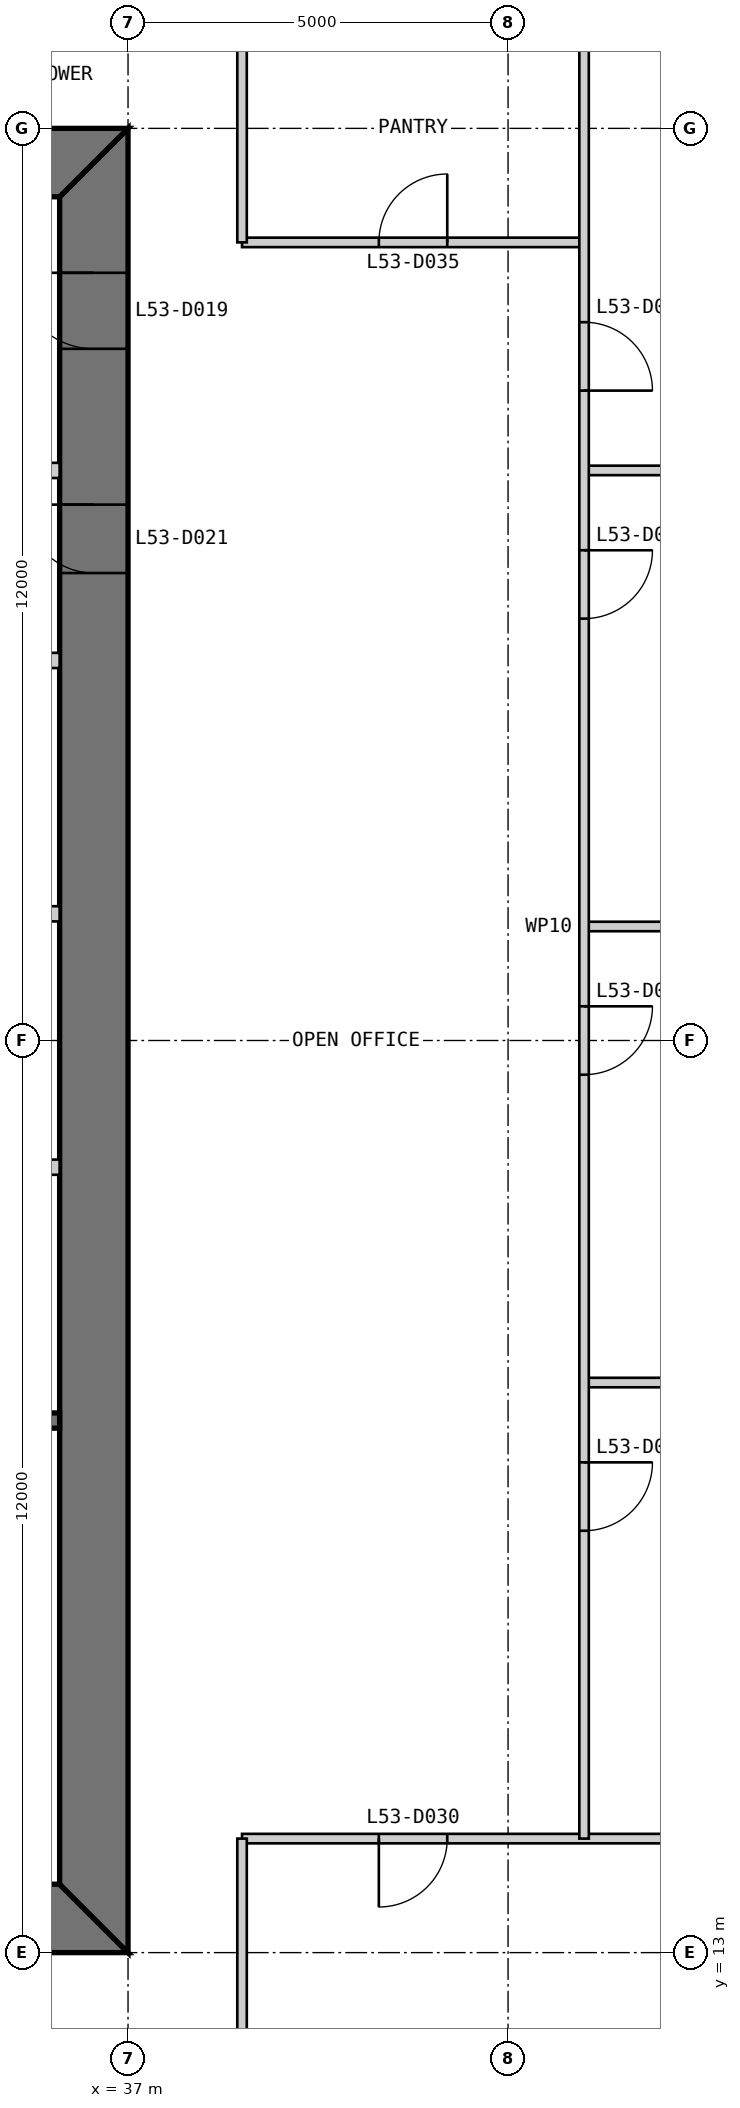
"""IFC4 building model, lengths in metres.
Left out: names, types, materials, properties, quantities, classifications, styles, units other than length and angle.
Written with IfcOpenShell. Run it as: python <this file> out.ifc"""

import sys

from ifc_helpers import new_model, si_unit, direction, frame, frame_2d, origin, place, context, subcontext, project, spatial, polyline, rectangle, outline, extrude, element, fill, save


model = new_model("IFC4")
c1 = context("Model", 3, precision=1e-05, world=origin(), true_north=direction((0.0, 1.0)))
c2 = subcontext(c1, "Body", "Model", "MODEL_VIEW")
j1 = project(units=[si_unit("LENGTHUNIT", "METRE"), si_unit("PLANEANGLEUNIT", "RADIAN")], contexts=[c1])
p1 = place(None, origin())
s1 = spatial("IfcSite", under=j1, at=p1, CompositionType="ELEMENT")
p2 = place(p1, origin())
s2 = spatial("IfcBuilding", under=s1, at=p2, CompositionType="ELEMENT")
p3 = place(p2, frame((0.0, 0.0, 225.8)))
s3 = spatial("IfcBuildingStorey", under=s2, at=p3, CompositionType="ELEMENT", Elevation=225.8)
p4 = place(p3, frame((13.0, 13.45, 0.0), z_axis=(0.0, 0.0, 1.0), x_axis=(1.0, 0.0, 0.0)))
e1 = element("IfcWall", 1, at=p4, inside=s3, PredefinedType="SHEAR", context=c2, shape_type="SweptSolid", body=[
    extrude(outline(polyline([(0.0, -0.45), (24.0, -0.45), (23.1, 0.45), (0.9, 0.45), (0.0, -0.45)])), origin(), (0.0, 0.0, 1.0), 4.0),
])
p5 = place(p4, frame((4.9, 0.0, 0.0)))
e2 = element("IfcOpeningElement", 2, at=p5, cuts=e1, PredefinedType="OPENING", context=c2, shape_type="SweptSolid", body=[
    extrude(rectangle(XDim=1.0, YDim=2.2, at=frame_2d((0.5, 1.1))), frame((0.0, 0.46, 0.0), z_axis=(0.0, -1.0, 0.0), x_axis=(1.0, 0.0, 0.0)), (0.0, 0.0, 1.0), 0.92),
])
p6 = place(p4, frame((8.9, 0.0, 0.0)))
e3 = element("IfcOpeningElement", 3, at=p6, cuts=e1, PredefinedType="OPENING", context=c2, shape_type="SweptSolid", body=[
    extrude(rectangle(XDim=1.1, YDim=2.2, at=frame_2d((0.55, 1.1))), frame((0.0, 0.46, 0.0), z_axis=(0.0, -1.0, 0.0), x_axis=(1.0, 0.0, 0.0)), (0.0, 0.0, 1.0), 0.92),
])
p7 = place(p4, frame((15.05, 0.0, 0.0)))
e4 = element("IfcOpeningElement", 4, at=p7, cuts=e1, PredefinedType="OPENING", context=c2, shape_type="SweptSolid", body=[
    extrude(rectangle(XDim=0.9, YDim=2.2, at=frame_2d((0.45, 1.1))), frame((0.0, 0.46, 0.0), z_axis=(0.0, -1.0, 0.0), x_axis=(1.0, 0.0, 0.0)), (0.0, 0.0, 1.0), 0.92),
])
p8 = place(p4, frame((17.9, 0.0, 0.0)))
e5 = element("IfcOpeningElement", 5, at=p8, cuts=e1, PredefinedType="OPENING", context=c2, shape_type="SweptSolid", body=[
    extrude(rectangle(XDim=1.0, YDim=2.2, at=frame_2d((0.5, 1.1))), frame((0.0, 0.46, 0.0), z_axis=(0.0, -1.0, 0.0), x_axis=(1.0, 0.0, 0.0)), (0.0, 0.0, 1.0), 0.92),
])
p9 = place(p4, frame((21.4, 0.0, 0.0)))
e6 = element("IfcOpeningElement", 6, at=p9, cuts=e1, PredefinedType="OPENING", context=c2, shape_type="SweptSolid", body=[
    extrude(rectangle(XDim=1.0, YDim=2.2, at=frame_2d((0.5, 1.1))), frame((0.0, 0.46, 0.0), z_axis=(0.0, -1.0, 0.0), x_axis=(1.0, 0.0, 0.0)), (0.0, 0.0, 1.0), 0.92),
])
p10 = place(p3, frame((36.55, 13.9, 0.0), z_axis=(0.0, 0.0, 1.0), x_axis=(0.0, 1.0, 0.0)))
e7 = element("IfcWall", 7, at=p10, inside=s3, PredefinedType="SHEAR", context=c2, shape_type="SweptSolid", body=[
    extrude(outline(polyline([(-0.9, -0.45), (23.1, -0.45), (22.2, 0.45), (0.0, 0.45), (-0.9, -0.45)])), origin(), (0.0, 0.0, 1.0), 4.0),
])
p11 = place(p10, frame((20.2, 0.0, 0.0)))
e8 = element("IfcOpeningElement", 8, at=p11, cuts=e7, PredefinedType="OPENING", context=c2, shape_type="SweptSolid", body=[
    extrude(rectangle(XDim=1.0, YDim=2.2, at=frame_2d((0.5, 1.1))), frame((0.0, 0.46, 0.0), z_axis=(0.0, -1.0, 0.0), x_axis=(1.0, 0.0, 0.0)), (0.0, 0.0, 1.0), 0.92),
])
p12 = place(p10, frame((17.25, 0.0, 0.0)))
e9 = element("IfcOpeningElement", 9, at=p12, cuts=e7, PredefinedType="OPENING", context=c2, shape_type="SweptSolid", body=[
    extrude(rectangle(XDim=0.9, YDim=2.2, at=frame_2d((0.45, 1.1))), frame((0.0, 0.46, 0.0), z_axis=(0.0, -1.0, 0.0), x_axis=(1.0, 0.0, 0.0)), (0.0, 0.0, 1.0), 0.92),
])
p13 = place(p3, frame((37.0, 36.55, 0.0), z_axis=(0.0, 0.0, 1.0), x_axis=(-1.0, 0.0, 0.0)))
e10 = element("IfcWall", 10, at=p13, inside=s3, PredefinedType="SHEAR", context=c2, shape_type="SweptSolid", body=[
    extrude(outline(polyline([(0.0, -0.45), (24.0, -0.45), (23.1, 0.45), (0.9, 0.45), (0.0, -0.45)])), origin(), (0.0, 0.0, 1.0), 4.0),
])
p14 = place(p13, frame((4.9, 0.0, 0.0)))
e11 = element("IfcOpeningElement", 11, at=p14, cuts=e10, PredefinedType="OPENING", context=c2, shape_type="SweptSolid", body=[
    extrude(rectangle(XDim=1.0, YDim=2.2, at=frame_2d((0.5, 1.1))), frame((0.0, 0.46, 0.0), z_axis=(0.0, -1.0, 0.0), x_axis=(1.0, 0.0, 0.0)), (0.0, 0.0, 1.0), 0.92),
])
p15 = place(p13, frame((8.9, 0.0, 0.0)))
e12 = element("IfcOpeningElement", 12, at=p15, cuts=e10, PredefinedType="OPENING", context=c2, shape_type="SweptSolid", body=[
    extrude(rectangle(XDim=1.1, YDim=2.2, at=frame_2d((0.55, 1.1))), frame((0.0, 0.46, 0.0), z_axis=(0.0, -1.0, 0.0), x_axis=(1.0, 0.0, 0.0)), (0.0, 0.0, 1.0), 0.92),
])
p16 = place(p13, frame((15.05, 0.0, 0.0)))
e13 = element("IfcOpeningElement", 13, at=p16, cuts=e10, PredefinedType="OPENING", context=c2, shape_type="SweptSolid", body=[
    extrude(rectangle(XDim=0.9, YDim=2.2, at=frame_2d((0.45, 1.1))), frame((0.0, 0.46, 0.0), z_axis=(0.0, -1.0, 0.0), x_axis=(1.0, 0.0, 0.0)), (0.0, 0.0, 1.0), 0.92),
])
p17 = place(p13, frame((17.9, 0.0, 0.0)))
e14 = element("IfcOpeningElement", 14, at=p17, cuts=e10, PredefinedType="OPENING", context=c2, shape_type="SweptSolid", body=[
    extrude(rectangle(XDim=1.0, YDim=2.2, at=frame_2d((0.5, 1.1))), frame((0.0, 0.46, 0.0), z_axis=(0.0, -1.0, 0.0), x_axis=(1.0, 0.0, 0.0)), (0.0, 0.0, 1.0), 0.92),
])
p18 = place(p13, frame((21.4, 0.0, 0.0)))
e15 = element("IfcOpeningElement", 15, at=p18, cuts=e10, PredefinedType="OPENING", context=c2, shape_type="SweptSolid", body=[
    extrude(rectangle(XDim=1.0, YDim=2.2, at=frame_2d((0.5, 1.1))), frame((0.0, 0.46, 0.0), z_axis=(0.0, -1.0, 0.0), x_axis=(1.0, 0.0, 0.0)), (0.0, 0.0, 1.0), 0.92),
])
p19 = place(p3, frame((20.3, 20.0, 0.0), z_axis=(0.0, 0.0, 1.0), x_axis=(1.0, 0.0, 0.0)))
e16 = element("IfcWall", 16, at=p19, inside=s3, PredefinedType="SOLIDWALL", context=c2, shape_type="SweptSolid", body=[
    extrude(rectangle(XDim=15.8, YDim=0.2, at=frame_2d((7.9, 0.0))), origin(), (0.0, 0.0, 1.0), 3.8),
])
for number, where, z_axis, x_axis in (
    (17, (36.1, 30.0, 0.0), (0.0, 0.0, 1.0), (-1.0, 0.0, 0.0)),
    (18, (36.1, 26.667, 0.0), (0.0, 0.0, 1.0), (-1.0, 0.0, 0.0)),
    (19, (36.1, 23.333, 0.0), (0.0, 0.0, 1.0), (-1.0, 0.0, 0.0)),
    (20, (36.1, 32.5, 0.0), (0.0, 0.0, 1.0), (-1.0, 0.0, 0.0)),
):
    element("IfcWall", number, at=place(p3, frame(where, z_axis=z_axis, x_axis=x_axis)), inside=s3, PredefinedType="PARTITIONING", context=c2, shape_type="SweptSolid", body=[
        extrude(rectangle(XDim=2.8, YDim=0.2, at=frame_2d((1.4, 0.0))), origin(), (0.0, 0.0, 1.0), 3.8),
    ])
p20 = place(p3, frame((49.85, 14.5, 0.0), z_axis=(0.0, 0.0, 1.0), x_axis=(-1.0, 0.0, 0.0)))
e21 = element("IfcWall", 21, at=p20, inside=s3, PredefinedType="PARTITIONING", context=c2, shape_type="SweptSolid", body=[
    extrude(rectangle(XDim=11.35, YDim=0.125, at=frame_2d((5.675, 0.0))), origin(), (0.0, 0.0, 1.0), 3.85),
])
p21 = place(p20, frame((8.65, 0.0, 0.0)))
e22 = element("IfcOpeningElement", 22, at=p21, cuts=e21, PredefinedType="OPENING", context=c2, shape_type="SweptSolid", body=[
    extrude(rectangle(XDim=0.9, YDim=2.2, at=frame_2d((0.45, 1.1))), frame((0.0, 0.073, 0.0), z_axis=(0.0, -1.0, 0.0), x_axis=(1.0, 0.0, 0.0)), (0.0, 0.0, 1.0), 0.145),
])
for number, where, z_axis, x_axis in (
    (23, (49.85, 20.5, 0.0), (0.0, 0.0, 1.0), (-1.0, 0.0, 0.0)),
    (24, (49.85, 26.5, 0.0), (0.0, 0.0, 1.0), (-1.0, 0.0, 0.0)),
    (25, (49.85, 32.5, 0.0), (0.0, 0.0, 1.0), (-1.0, 0.0, 0.0)),
):
    element("IfcWall", number, at=place(p3, frame(where, z_axis=z_axis, x_axis=x_axis)), inside=s3, PredefinedType="PARTITIONING", context=c2, shape_type="SweptSolid", body=[
        extrude(rectangle(XDim=6.85, YDim=0.125, at=frame_2d((3.425, 0.0))), origin(), (0.0, 0.0, 1.0), 3.85),
    ])
p22 = place(p3, frame((43.0, 35.5, 0.0), z_axis=(0.0, 0.0, 1.0), x_axis=(-1.0, 0.0, 0.0)))
e26 = element("IfcWall", 26, at=p22, inside=s3, PredefinedType="PARTITIONING", context=c2, shape_type="SweptSolid", body=[
    extrude(rectangle(XDim=4.5, YDim=0.125, at=frame_2d((2.25, 0.0))), origin(), (0.0, 0.0, 1.0), 3.85),
])
p23 = place(p22, frame((1.8, 0.0, 0.0)))
e27 = element("IfcOpeningElement", 27, at=p23, cuts=e26, PredefinedType="OPENING", context=c2, shape_type="SweptSolid", body=[
    extrude(rectangle(XDim=0.9, YDim=2.2, at=frame_2d((0.45, 1.1))), frame((0.0, 0.073, 0.0), z_axis=(0.0, -1.0, 0.0), x_axis=(1.0, 0.0, 0.0)), (0.0, 0.0, 1.0), 0.145),
])
p24 = place(p3, frame((43.0, 14.5, 0.0), z_axis=(0.0, 0.0, 1.0), x_axis=(0.0, 1.0, 0.0)))
e28 = element("IfcWall", 28, at=p24, inside=s3, PredefinedType="PARTITIONING", context=c2, shape_type="SweptSolid", body=[
    extrude(rectangle(XDim=24.0, YDim=0.125, at=frame_2d((12.0, 0.0))), origin(), (0.0, 0.0, 1.0), 3.238),
])
p25 = place(p24, frame((4.05, 0.0, 0.0)))
e29 = element("IfcOpeningElement", 29, at=p25, cuts=e28, PredefinedType="OPENING", context=c2, shape_type="SweptSolid", body=[
    extrude(rectangle(XDim=0.9, YDim=2.2, at=frame_2d((0.45, 1.1))), frame((0.0, 0.073, 0.0), z_axis=(0.0, -1.0, 0.0), x_axis=(1.0, 0.0, 0.0)), (0.0, 0.0, 1.0), 0.145),
])
p26 = place(p24, frame((10.05, 0.0, 0.0)))
e30 = element("IfcOpeningElement", 30, at=p26, cuts=e28, PredefinedType="OPENING", context=c2, shape_type="SweptSolid", body=[
    extrude(rectangle(XDim=0.9, YDim=2.2, at=frame_2d((0.45, 1.1))), frame((0.0, 0.073, 0.0), z_axis=(0.0, -1.0, 0.0), x_axis=(1.0, 0.0, 0.0)), (0.0, 0.0, 1.0), 0.145),
])
p27 = place(p24, frame((16.05, 0.0, 0.0)))
e31 = element("IfcOpeningElement", 31, at=p27, cuts=e28, PredefinedType="OPENING", context=c2, shape_type="SweptSolid", body=[
    extrude(rectangle(XDim=0.9, YDim=2.2, at=frame_2d((0.45, 1.1))), frame((0.0, 0.073, 0.0), z_axis=(0.0, -1.0, 0.0), x_axis=(1.0, 0.0, 0.0)), (0.0, 0.0, 1.0), 0.145),
])
p28 = place(p24, frame((19.05, 0.0, 0.0)))
e32 = element("IfcOpeningElement", 32, at=p28, cuts=e28, PredefinedType="OPENING", context=c2, shape_type="SweptSolid", body=[
    extrude(rectangle(XDim=0.9, YDim=2.2, at=frame_2d((0.45, 1.1))), frame((0.0, 0.073, 0.0), z_axis=(0.0, -1.0, 0.0), x_axis=(1.0, 0.0, 0.0)), (0.0, 0.0, 1.0), 0.145),
])
for number, where, z_axis, x_axis in (
    (33, (38.5, 11.5, 0.0), (0.0, 0.0, 1.0), (0.0, 1.0, 0.0)),
    (34, (38.5, 35.5, 0.0), (0.0, 0.0, 1.0), (0.0, 1.0, 0.0)),
):
    element("IfcWall", number, at=place(p3, frame(where, z_axis=z_axis, x_axis=x_axis)), inside=s3, PredefinedType="PARTITIONING", context=c2, shape_type="SweptSolid", body=[
        extrude(rectangle(XDim=3.0, YDim=0.125, at=frame_2d((1.5, 0.0))), origin(), (0.0, 0.0, 1.0), 3.85),
    ])
p29 = place(p11, origin())
e35 = element("IfcDoor", 35, at=p29, inside=s3, OperationType="SINGLE_SWING_RIGHT", PredefinedType="DOOR", context=c2, shape_type="SweptSolid", body=[
    extrude(rectangle(XDim=1.0, YDim=2.2, at=frame_2d((0.5, 1.1))), frame((0.0, 0.025, 0.0), z_axis=(0.0, -1.0, 0.0), x_axis=(1.0, 0.0, 0.0)), (0.0, 0.0, 1.0), 0.05),
    extrude(outline(polyline([(0.0, 0.0), (0.04, 0.0), (0.04, 2.16), (0.96, 2.16), (0.96, 0.0), (1.0, 0.0), (1.0, 2.2), (0.0, 2.2), (0.0, 0.0)])), frame((0.0, 0.3, 0.0), z_axis=(0.0, -1.0, 0.0), x_axis=(1.0, 0.0, 0.0)), (0.0, 0.0, 1.0), 0.6),
])
fill(e8, e35)
p30 = place(p12, origin())
e36 = element("IfcDoor", 36, at=p30, inside=s3, OperationType="SINGLE_SWING_RIGHT", PredefinedType="DOOR", context=c2, shape_type="SweptSolid", body=[
    extrude(rectangle(XDim=0.9, YDim=2.2, at=frame_2d((0.45, 1.1))), frame((0.0, 0.025, 0.0), z_axis=(0.0, -1.0, 0.0), x_axis=(1.0, 0.0, 0.0)), (0.0, 0.0, 1.0), 0.05),
    extrude(outline(polyline([(0.0, 0.0), (0.04, 0.0), (0.04, 2.16), (0.86, 2.16), (0.86, 0.0), (0.9, 0.0), (0.9, 2.2), (0.0, 2.2), (0.0, 0.0)])), frame((0.0, 0.3, 0.0), z_axis=(0.0, -1.0, 0.0), x_axis=(1.0, 0.0, 0.0)), (0.0, 0.0, 1.0), 0.6),
])
fill(e9, e36)
p31 = place(p21, origin())
e37 = element("IfcDoor", 37, at=p31, inside=s3, OperationType="SINGLE_SWING_RIGHT", PredefinedType="DOOR", context=c2, shape_type="SweptSolid", body=[
    extrude(rectangle(XDim=0.9, YDim=2.2, at=frame_2d((0.45, 1.1))), frame((0.0, 0.025, 0.0), z_axis=(0.0, -1.0, 0.0), x_axis=(1.0, 0.0, 0.0)), (0.0, 0.0, 1.0), 0.05),
])
fill(e22, e37)
p32 = place(p25, frame((0.9, 0.0, 0.0), z_axis=(0.0, 0.0, 1.0), x_axis=(-1.0, 0.0, 0.0)))
e38 = element("IfcDoor", 38, at=p32, inside=s3, OperationType="SINGLE_SWING_LEFT", PredefinedType="DOOR", context=c2, shape_type="SweptSolid", body=[
    extrude(rectangle(XDim=0.9, YDim=2.2, at=frame_2d((0.45, 1.1))), frame((0.0, 0.025, 0.0), z_axis=(0.0, -1.0, 0.0), x_axis=(1.0, 0.0, 0.0)), (0.0, 0.0, 1.0), 0.05),
])
fill(e29, e38)
p33 = place(p26, frame((0.9, 0.0, 0.0), z_axis=(0.0, 0.0, 1.0), x_axis=(-1.0, 0.0, 0.0)))
e39 = element("IfcDoor", 39, at=p33, inside=s3, OperationType="SINGLE_SWING_LEFT", PredefinedType="DOOR", context=c2, shape_type="SweptSolid", body=[
    extrude(rectangle(XDim=0.9, YDim=2.2, at=frame_2d((0.45, 1.1))), frame((0.0, 0.025, 0.0), z_axis=(0.0, -1.0, 0.0), x_axis=(1.0, 0.0, 0.0)), (0.0, 0.0, 1.0), 0.05),
])
fill(e30, e39)
p34 = place(p27, frame((0.9, 0.0, 0.0), z_axis=(0.0, 0.0, 1.0), x_axis=(-1.0, 0.0, 0.0)))
e40 = element("IfcDoor", 40, at=p34, inside=s3, OperationType="SINGLE_SWING_LEFT", PredefinedType="DOOR", context=c2, shape_type="SweptSolid", body=[
    extrude(rectangle(XDim=0.9, YDim=2.2, at=frame_2d((0.45, 1.1))), frame((0.0, 0.025, 0.0), z_axis=(0.0, -1.0, 0.0), x_axis=(1.0, 0.0, 0.0)), (0.0, 0.0, 1.0), 0.05),
])
fill(e31, e40)
p35 = place(p28, frame((0.9, 0.0, 0.0), z_axis=(0.0, 0.0, 1.0), x_axis=(-1.0, 0.0, 0.0)))
e41 = element("IfcDoor", 41, at=p35, inside=s3, OperationType="SINGLE_SWING_RIGHT", PredefinedType="DOOR", context=c2, shape_type="SweptSolid", body=[
    extrude(rectangle(XDim=0.9, YDim=2.2, at=frame_2d((0.45, 1.1))), frame((0.0, 0.025, 0.0), z_axis=(0.0, -1.0, 0.0), x_axis=(1.0, 0.0, 0.0)), (0.0, 0.0, 1.0), 0.05),
])
fill(e32, e41)
p36 = place(p23, frame((0.9, 0.0, 0.0), z_axis=(0.0, 0.0, 1.0), x_axis=(-1.0, 0.0, 0.0)))
e42 = element("IfcDoor", 42, at=p36, inside=s3, OperationType="SINGLE_SWING_RIGHT", PredefinedType="DOOR", context=c2, shape_type="SweptSolid", body=[
    extrude(rectangle(XDim=0.9, YDim=2.2, at=frame_2d((0.45, 1.1))), frame((0.0, 0.025, 0.0), z_axis=(0.0, -1.0, 0.0), x_axis=(1.0, 0.0, 0.0)), (0.0, 0.0, 1.0), 0.05),
])
fill(e27, e42)
save(model, sys.argv[1])
